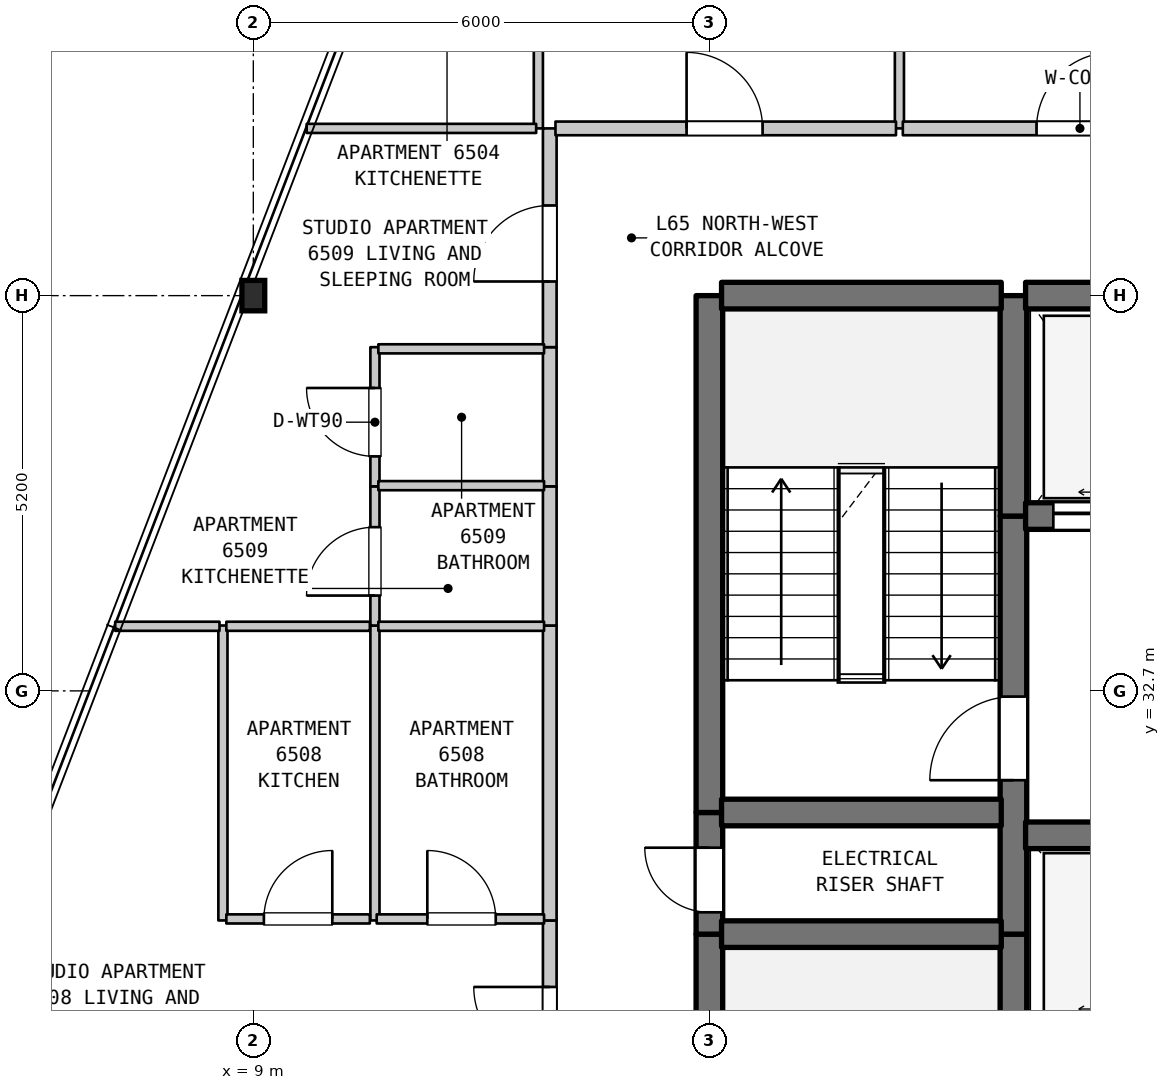
"""IFC4 building model, lengths in metres.
Left out: names, types, materials, properties, quantities, classifications, styles, units other than length and angle.
Written with IfcOpenShell. Run it as: python <this file> out.ifc"""

import sys

from ifc_helpers import new_model, si_unit, direction, frame, frame_2d, origin, origin_2d, place, context, subcontext, project, spatial, rectangle, i_section, extrude, element, fill, save


model = new_model("IFC4")
c1 = context("Model", 3, precision=1e-05, world=origin(), true_north=direction((0.0, 1.0)))
c2 = subcontext(c1, "Body", "Model", "MODEL_VIEW")
j1 = project(units=[si_unit("LENGTHUNIT", "METRE"), si_unit("PLANEANGLEUNIT", "RADIAN")], contexts=[c1])
p1 = place(None, origin())
s1 = spatial("IfcSite", under=j1, at=p1, CompositionType="ELEMENT")
p2 = place(p1, origin())
s2 = spatial("IfcBuilding", under=s1, at=p2, CompositionType="ELEMENT")
p3 = place(p2, frame((0.0, 0.0, 262.1)))
s3 = spatial("IfcBuildingStorey", under=s2, at=p3, CompositionType="ELEMENT", Elevation=262.1)
p4 = place(p3, frame((9.0, 37.9, 0.0), z_axis=(0.0, 0.0, 1.0), x_axis=(1.0, 0.0, 0.0)))
e1 = element("IfcColumn", 1, at=p4, inside=s3, PredefinedType="COLUMN", context=c2, shape_type="SweptSolid", body=[
    extrude(i_section(OverallWidth=0.3, OverallDepth=0.4, WebThickness=0.013, FlangeThickness=0.024, FilletRadius=0.027, at=origin_2d()), origin(), (0.0, 0.0, 1.0), 3.7),
])
for number, where, z_axis, x_axis in (
    (2, (8.6, 29.68, 0.0), (0.0, 0.0, 1.0), (0.0, 1.0, 0.0)),
    (3, (10.6, 29.68, 0.0), (0.0, 0.0, 1.0), (0.0, 1.0, 0.0)),
):
    element("IfcWall", number, at=place(p3, frame(where, z_axis=z_axis, x_axis=x_axis)), inside=s3, PredefinedType="PARTITIONING", context=c2, shape_type="SweptSolid", body=[
        extrude(rectangle(XDim=3.88, YDim=0.12, at=frame_2d((1.94, 0.0))), origin(), (0.0, 0.0, 1.0), 3.39),
    ])
p5 = place(p3, frame((10.6, 33.56, 0.0), z_axis=(0.0, 0.0, 1.0), x_axis=(0.0, 1.0, 0.0)))
e4 = element("IfcWall", 4, at=p5, inside=s3, PredefinedType="PARTITIONING", context=c2, shape_type="SweptSolid", body=[
    extrude(rectangle(XDim=1.831, YDim=0.12, at=frame_2d((0.916, 0.0))), origin(), (0.0, 0.0, 1.0), 3.39),
])
p6 = place(p5, frame((0.394, 0.0, 0.0)))
e5 = element("IfcOpeningElement", 5, at=p6, cuts=e4, PredefinedType="OPENING", context=c2, shape_type="SweptSolid", body=[
    extrude(rectangle(XDim=0.9, YDim=2.15, at=frame_2d((0.45, 1.075))), frame((0.0, 0.07, 0.0), z_axis=(0.0, -1.0, 0.0), x_axis=(1.0, 0.0, 0.0)), (0.0, 0.0, 1.0), 0.14),
])
p7 = place(p3, frame((10.6, 35.391, 0.0), z_axis=(0.0, 0.0, 1.0), x_axis=(0.0, 1.0, 0.0)))
e6 = element("IfcWall", 6, at=p7, inside=s3, PredefinedType="PARTITIONING", context=c2, shape_type="SweptSolid", body=[
    extrude(rectangle(XDim=1.831, YDim=0.12, at=frame_2d((0.916, 0.0))), origin(), (0.0, 0.0, 1.0), 3.39),
])
p8 = place(p7, frame((0.394, 0.0, 0.0)))
e7 = element("IfcOpeningElement", 7, at=p8, cuts=e6, PredefinedType="OPENING", context=c2, shape_type="SweptSolid", body=[
    extrude(rectangle(XDim=0.9, YDim=2.1, at=frame_2d((0.45, 1.05))), frame((0.0, 0.07, 0.0), z_axis=(0.0, -1.0, 0.0), x_axis=(1.0, 0.0, 0.0)), (0.0, 0.0, 1.0), 0.14),
])
p9 = place(p3, frame((12.75, 40.1, 0.0), z_axis=(0.0, 0.0, 1.0), x_axis=(0.0, 1.0, 0.0)))
e8 = element("IfcWall", 8, at=p9, inside=s3, PredefinedType="PARTITIONING", context=c2, shape_type="SweptSolid", body=[
    extrude(rectangle(XDim=3.2, YDim=0.12, at=frame_2d((1.6, 0.0))), origin(), (0.0, 0.0, 1.0), 3.39),
])
p10 = place(p9, frame((1.15, 0.0, 0.0)))
e9 = element("IfcOpeningElement", 9, at=p10, cuts=e8, PredefinedType="OPENING", context=c2, shape_type="SweptSolid", body=[
    extrude(rectangle(XDim=0.9, YDim=2.15, at=frame_2d((0.45, 1.075))), frame((0.0, 0.07, 0.0), z_axis=(0.0, -1.0, 0.0), x_axis=(1.0, 0.0, 0.0)), (0.0, 0.0, 1.0), 0.14),
])
p11 = place(p3, frame((12.9, 26.93, 0.0), z_axis=(0.0, 0.0, 1.0), x_axis=(0.0, 1.0, 0.0)))
e10 = element("IfcWall", 10, at=p11, inside=s3, PredefinedType="STANDARD", context=c2, shape_type="SweptSolid", body=[
    extrude(rectangle(XDim=2.75, YDim=0.18, at=frame_2d((1.375, 0.0))), origin(), (0.0, 0.0, 1.0), 3.39),
])
p12 = place(p11, frame((0.875, 0.0, 0.0)))
e11 = element("IfcOpeningElement", 11, at=p12, cuts=e10, PredefinedType="OPENING", context=c2, shape_type="SweptSolid", body=[
    extrude(rectangle(XDim=1.0, YDim=2.15, at=frame_2d((0.5, 1.075))), frame((0.0, 0.1, 0.0), z_axis=(0.0, -1.0, 0.0), x_axis=(1.0, 0.0, 0.0)), (0.0, 0.0, 1.0), 0.2),
])
p13 = place(p3, frame((12.9, 29.68, 0.0), z_axis=(0.0, 0.0, 1.0), x_axis=(0.0, 1.0, 0.0)))
e12 = element("IfcWall", 12, at=p13, inside=s3, PredefinedType="STANDARD", context=c2, shape_type="SweptSolid", body=[
    extrude(rectangle(XDim=3.88, YDim=0.18, at=frame_2d((1.94, 0.0))), origin(), (0.0, 0.0, 1.0), 3.39),
])
p14 = place(p3, frame((12.9, 33.56, 0.0), z_axis=(0.0, 0.0, 1.0), x_axis=(0.0, 1.0, 0.0)))
e13 = element("IfcWall", 13, at=p14, inside=s3, PredefinedType="STANDARD", context=c2, shape_type="SweptSolid", body=[
    extrude(rectangle(XDim=1.831, YDim=0.18, at=frame_2d((0.916, 0.0))), origin(), (0.0, 0.0, 1.0), 3.39),
])
p15 = place(p3, frame((12.9, 35.391, 0.0), z_axis=(0.0, 0.0, 1.0), x_axis=(0.0, 1.0, 0.0)))
e14 = element("IfcWall", 14, at=p15, inside=s3, PredefinedType="STANDARD", context=c2, shape_type="SweptSolid", body=[
    extrude(rectangle(XDim=1.831, YDim=0.18, at=frame_2d((0.916, 0.0))), origin(), (0.0, 0.0, 1.0), 3.39),
])
p16 = place(p3, frame((12.9, 37.222, 0.0), z_axis=(0.0, 0.0, 1.0), x_axis=(0.0, 1.0, 0.0)))
e15 = element("IfcWall", 15, at=p16, inside=s3, PredefinedType="STANDARD", context=c2, shape_type="SweptSolid", body=[
    extrude(rectangle(XDim=2.878, YDim=0.18, at=frame_2d((1.439, 0.0))), origin(), (0.0, 0.0, 1.0), 3.39),
])
p17 = place(p16, frame((0.864, 0.0, 0.0)))
e16 = element("IfcOpeningElement", 16, at=p17, cuts=e15, PredefinedType="OPENING", context=c2, shape_type="SweptSolid", body=[
    extrude(rectangle(XDim=1.0, YDim=2.15, at=frame_2d((0.5, 1.075))), frame((0.0, 0.1, 0.0), z_axis=(0.0, -1.0, 0.0), x_axis=(1.0, 0.0, 0.0)), (0.0, 0.0, 1.0), 0.2),
])
p18 = place(p3, frame((15.0, 22.7, 0.0), z_axis=(0.0, 0.0, 1.0), x_axis=(0.0, 1.0, 0.0)))
e17 = element("IfcWall", 17, at=p18, inside=s3, PredefinedType="SHEAR", context=c2, shape_type="SweptSolid", body=[
    extrude(rectangle(XDim=6.8, YDim=0.35, at=frame_2d((3.4, 0.0))), origin(), (0.0, 0.0, 1.0), 3.39),
])
p19 = place(p3, frame((15.0, 29.5, 0.0), z_axis=(0.0, 0.0, 1.0), x_axis=(0.0, 1.0, 0.0)))
e18 = element("IfcWall", 18, at=p19, inside=s3, PredefinedType="SHEAR", context=c2, shape_type="SweptSolid", body=[
    extrude(rectangle(XDim=1.6, YDim=0.35, at=frame_2d((0.8, 0.0))), origin(), (0.0, 0.0, 1.0), 3.39),
])
p20 = place(p19, frame((0.287, 0.0, 0.0)))
e19 = element("IfcOpeningElement", 19, at=p20, cuts=e18, PredefinedType="OPENING", context=c2, shape_type="SweptSolid", body=[
    extrude(rectangle(XDim=0.85, YDim=2.1, at=frame_2d((0.425, 1.05))), frame((0.0, 0.185, 0.0), z_axis=(0.0, -1.0, 0.0), x_axis=(1.0, 0.0, 0.0)), (0.0, 0.0, 1.0), 0.37),
])
p21 = place(p3, frame((15.0, 31.1, 0.0), z_axis=(0.0, 0.0, 1.0), x_axis=(0.0, 1.0, 0.0)))
e20 = element("IfcWall", 20, at=p21, inside=s3, PredefinedType="SHEAR", context=c2, shape_type="SweptSolid", body=[
    extrude(rectangle(XDim=6.8, YDim=0.35, at=frame_2d((3.4, 0.0))), origin(), (0.0, 0.0, 1.0), 3.39),
])
p22 = place(p3, frame((17.5, 40.1, 0.0), z_axis=(0.0, 0.0, 1.0), x_axis=(0.0, 1.0, 0.0)))
e21 = element("IfcWall", 21, at=p22, inside=s3, PredefinedType="PARTITIONING", context=c2, shape_type="SweptSolid", body=[
    extrude(rectangle(XDim=13.79, YDim=0.12, at=frame_2d((6.895, 0.0))), origin(), (0.0, 0.0, 1.0), 3.39),
])
p23 = place(p3, frame((19.0, 28.2, 0.0), z_axis=(0.0, 0.0, 1.0), x_axis=(0.0, 1.0, 0.0)))
e22 = element("IfcWall", 22, at=p23, inside=s3, PredefinedType="SHEAR", context=c2, shape_type="SweptSolid", body=[
    extrude(rectangle(XDim=1.3, YDim=0.35, at=frame_2d((0.65, 0.0))), origin(), (0.0, 0.0, 1.0), 3.39),
])
p24 = place(p3, frame((19.0, 29.5, 0.0), z_axis=(0.0, 0.0, 1.0), x_axis=(0.0, 1.0, 0.0)))
e23 = element("IfcWall", 23, at=p24, inside=s3, PredefinedType="SHEAR", context=c2, shape_type="SweptSolid", body=[
    extrude(rectangle(XDim=5.5, YDim=0.35, at=frame_2d((2.75, 0.0))), origin(), (0.0, 0.0, 1.0), 3.39),
])
p25 = place(p24, frame((2.025, 0.0, 0.0)))
e24 = element("IfcOpeningElement", 24, at=p25, cuts=e23, PredefinedType="OPENING", context=c2, shape_type="SweptSolid", body=[
    extrude(rectangle(XDim=1.1, YDim=2.15, at=frame_2d((0.55, 1.075))), frame((0.0, 0.185, 0.0), z_axis=(0.0, -1.0, 0.0), x_axis=(1.0, 0.0, 0.0)), (0.0, 0.0, 1.0), 0.37),
])
p26 = place(p3, frame((19.0, 35.0, 0.0), z_axis=(0.0, 0.0, 1.0), x_axis=(0.0, 1.0, 0.0)))
e25 = element("IfcWall", 25, at=p26, inside=s3, PredefinedType="SHEAR", context=c2, shape_type="SweptSolid", body=[
    extrude(rectangle(XDim=2.9, YDim=0.35, at=frame_2d((1.45, 0.0))), origin(), (0.0, 0.0, 1.0), 3.39),
])
p27 = place(p3, frame((15.16, 29.5, 0.0), z_axis=(0.0, 0.0, 1.0), x_axis=(1.0, 0.0, 0.0)))
e26 = element("IfcWall", 26, at=p27, inside=s3, PredefinedType="SHEAR", context=c2, shape_type="SweptSolid", body=[
    extrude(rectangle(XDim=3.68, YDim=0.35, at=frame_2d((1.84, 0.0))), origin(), (0.0, 0.0, 1.0), 3.39),
])
p28 = place(p3, frame((8.645, 29.7, 0.0), z_axis=(0.0, 0.0, 1.0), x_axis=(1.0, 0.0, 0.0)))
e27 = element("IfcWall", 27, at=p28, inside=s3, PredefinedType="PARTITIONING", context=c2, shape_type="SweptSolid", body=[
    extrude(rectangle(XDim=1.888, YDim=0.12, at=frame_2d((0.944, 0.0))), origin(), (0.0, 0.0, 1.0), 3.39),
])
p29 = place(p28, frame((0.494, 0.0, 0.0)))
e28 = element("IfcOpeningElement", 28, at=p29, cuts=e27, PredefinedType="OPENING", context=c2, shape_type="SweptSolid", body=[
    extrude(rectangle(XDim=0.9, YDim=2.15, at=frame_2d((0.45, 1.075))), frame((0.0, 0.07, 0.0), z_axis=(0.0, -1.0, 0.0), x_axis=(1.0, 0.0, 0.0)), (0.0, 0.0, 1.0), 0.14),
])
p30 = place(p3, frame((10.623, 29.7, 0.0), z_axis=(0.0, 0.0, 1.0), x_axis=(1.0, 0.0, 0.0)))
e29 = element("IfcWall", 29, at=p30, inside=s3, PredefinedType="PARTITIONING", context=c2, shape_type="SweptSolid", body=[
    extrude(rectangle(XDim=2.202, YDim=0.12, at=frame_2d((1.101, 0.0))), origin(), (0.0, 0.0, 1.0), 3.39),
])
p31 = place(p30, frame((0.666, 0.0, 0.0)))
e30 = element("IfcOpeningElement", 30, at=p31, cuts=e29, PredefinedType="OPENING", context=c2, shape_type="SweptSolid", body=[
    extrude(rectangle(XDim=0.9, YDim=2.1, at=frame_2d((0.45, 1.05))), frame((0.0, 0.07, 0.0), z_axis=(0.0, -1.0, 0.0), x_axis=(1.0, 0.0, 0.0)), (0.0, 0.0, 1.0), 0.14),
])
p32 = place(p3, frame((19.16, 30.8, 0.0), z_axis=(0.0, 0.0, 1.0), x_axis=(1.0, 0.0, 0.0)))
e31 = element("IfcWall", 31, at=p32, inside=s3, PredefinedType="SHEAR", context=c2, shape_type="SweptSolid", body=[
    extrude(rectangle(XDim=4.48, YDim=0.35, at=frame_2d((2.24, 0.0))), origin(), (0.0, 0.0, 1.0), 3.39),
])
p33 = place(p3, frame((15.16, 31.1, 0.0), z_axis=(0.0, 0.0, 1.0), x_axis=(1.0, 0.0, 0.0)))
e32 = element("IfcWall", 32, at=p33, inside=s3, PredefinedType="SHEAR", context=c2, shape_type="SweptSolid", body=[
    extrude(rectangle(XDim=3.68, YDim=0.35, at=frame_2d((1.84, 0.0))), origin(), (0.0, 0.0, 1.0), 3.39),
])
p34 = place(p3, frame((7.183, 33.55, 0.0), z_axis=(0.0, 0.0, 1.0), x_axis=(1.0, 0.0, 0.0)))
e33 = element("IfcWall", 33, at=p34, inside=s3, PredefinedType="PARTITIONING", context=c2, shape_type="SweptSolid", body=[
    extrude(rectangle(XDim=1.372, YDim=0.12, at=frame_2d((0.686, 0.0))), origin(), (0.0, 0.0, 1.0), 3.39),
])
p35 = place(p3, frame((8.645, 33.55, 0.0), z_axis=(0.0, 0.0, 1.0), x_axis=(1.0, 0.0, 0.0)))
e34 = element("IfcWall", 34, at=p35, inside=s3, PredefinedType="PARTITIONING", context=c2, shape_type="SweptSolid", body=[
    extrude(rectangle(XDim=1.888, YDim=0.12, at=frame_2d((0.944, 0.0))), origin(), (0.0, 0.0, 1.0), 3.39),
])
p36 = place(p3, frame((10.645, 33.55, 0.0), z_axis=(0.0, 0.0, 1.0), x_axis=(1.0, 0.0, 0.0)))
e35 = element("IfcWall", 35, at=p36, inside=s3, PredefinedType="PARTITIONING", context=c2, shape_type="SweptSolid", body=[
    extrude(rectangle(XDim=2.18, YDim=0.12, at=frame_2d((1.09, 0.0))), origin(), (0.0, 0.0, 1.0), 3.39),
])
p37 = place(p3, frame((19.16, 35.0, 0.0), z_axis=(0.0, 0.0, 1.0), x_axis=(1.0, 0.0, 0.0)))
e36 = element("IfcWall", 36, at=p37, inside=s3, PredefinedType="SHEAR", context=c2, shape_type="SweptSolid", body=[
    extrude(rectangle(XDim=4.48, YDim=0.35, at=frame_2d((2.24, 0.0))), origin(), (0.0, 0.0, 1.0), 3.39),
])
p38 = place(p37, frame((0.365, 0.0, 0.0)))
e37 = element("IfcOpeningElement", 37, at=p38, cuts=e36, PredefinedType="OPENING", context=c2, shape_type="SweptSolid", body=[
    extrude(rectangle(XDim=1.35, YDim=2.2, at=frame_2d((0.675, 1.1))), frame((0.0, 0.185, 0.0), z_axis=(0.0, -1.0, 0.0), x_axis=(1.0, 0.0, 0.0)), (0.0, 0.0, 1.0), 0.37),
])
p39 = place(p37, frame((2.765, 0.0, 0.0)))
e38 = element("IfcOpeningElement", 38, at=p39, cuts=e36, PredefinedType="OPENING", context=c2, shape_type="SweptSolid", body=[
    extrude(rectangle(XDim=1.35, YDim=2.2, at=frame_2d((0.675, 1.1))), frame((0.0, 0.185, 0.0), z_axis=(0.0, -1.0, 0.0), x_axis=(1.0, 0.0, 0.0)), (0.0, 0.0, 1.0), 0.37),
])
for number, where, z_axis, x_axis in (
    (39, (10.645, 35.4, 0.0), (0.0, 0.0, 1.0), (1.0, 0.0, 0.0)),
    (40, (10.645, 37.2, 0.0), (0.0, 0.0, 1.0), (1.0, 0.0, 0.0)),
):
    element("IfcWall", number, at=place(p3, frame(where, z_axis=z_axis, x_axis=x_axis)), inside=s3, PredefinedType="PARTITIONING", context=c2, shape_type="SweptSolid", body=[
        extrude(rectangle(XDim=2.18, YDim=0.12, at=frame_2d((1.09, 0.0))), origin(), (0.0, 0.0, 1.0), 3.39),
    ])
p40 = place(p3, frame((15.16, 37.9, 0.0), z_axis=(0.0, 0.0, 1.0), x_axis=(1.0, 0.0, 0.0)))
e41 = element("IfcWall", 41, at=p40, inside=s3, PredefinedType="SHEAR", context=c2, shape_type="SweptSolid", body=[
    extrude(rectangle(XDim=3.68, YDim=0.35, at=frame_2d((1.84, 0.0))), origin(), (0.0, 0.0, 1.0), 3.39),
])
p41 = place(p3, frame((19.16, 37.9, 0.0), z_axis=(0.0, 0.0, 1.0), x_axis=(1.0, 0.0, 0.0)))
e42 = element("IfcWall", 42, at=p41, inside=s3, PredefinedType="SHEAR", context=c2, shape_type="SweptSolid", body=[
    extrude(rectangle(XDim=4.48, YDim=0.35, at=frame_2d((2.24, 0.0))), origin(), (0.0, 0.0, 1.0), 3.39),
])
p42 = place(p3, frame((9.702, 40.1, 0.0), z_axis=(0.0, 0.0, 1.0), x_axis=(1.0, 0.0, 0.0)))
e43 = element("IfcWall", 43, at=p42, inside=s3, PredefinedType="PARTITIONING", context=c2, shape_type="SweptSolid", body=[
    extrude(rectangle(XDim=3.019, YDim=0.12, at=frame_2d((1.51, 0.0))), origin(), (0.0, 0.0, 1.0), 3.39),
])
p43 = place(p3, frame((12.975, 40.1, 0.0), z_axis=(0.0, 0.0, 1.0), x_axis=(1.0, 0.0, 0.0)))
e44 = element("IfcWall", 44, at=p43, inside=s3, PredefinedType="STANDARD", context=c2, shape_type="SweptSolid", body=[
    extrude(rectangle(XDim=4.48, YDim=0.18, at=frame_2d((2.24, 0.0))), origin(), (0.0, 0.0, 1.0), 3.39),
])
p44 = place(p43, frame((1.725, 0.0, 0.0)))
e45 = element("IfcOpeningElement", 45, at=p44, cuts=e44, PredefinedType="OPENING", context=c2, shape_type="SweptSolid", body=[
    extrude(rectangle(XDim=1.0, YDim=2.15, at=frame_2d((0.5, 1.075))), frame((0.0, 0.1, 0.0), z_axis=(0.0, -1.0, 0.0), x_axis=(1.0, 0.0, 0.0)), (0.0, 0.0, 1.0), 0.2),
])
p45 = place(p3, frame((17.545, 40.1, 0.0), z_axis=(0.0, 0.0, 1.0), x_axis=(1.0, 0.0, 0.0)))
e46 = element("IfcWall", 46, at=p45, inside=s3, PredefinedType="STANDARD", context=c2, shape_type="SweptSolid", body=[
    extrude(rectangle(XDim=4.66, YDim=0.18, at=frame_2d((2.33, 0.0))), origin(), (0.0, 0.0, 1.0), 3.39),
])
p46 = place(p45, frame((1.759, 0.0, 0.0)))
e47 = element("IfcOpeningElement", 47, at=p46, cuts=e46, PredefinedType="OPENING", context=c2, shape_type="SweptSolid", body=[
    extrude(rectangle(XDim=1.0, YDim=2.15, at=frame_2d((0.5, 1.075))), frame((0.0, 0.1, 0.0), z_axis=(0.0, -1.0, 0.0), x_axis=(1.0, 0.0, 0.0)), (0.0, 0.0, 1.0), 0.2),
])
p47 = place(p6, origin())
e48 = element("IfcDoor", 48, at=p47, inside=s3, OperationType="SINGLE_SWING_LEFT", PredefinedType="DOOR", context=c2, shape_type="SweptSolid", body=[
    extrude(rectangle(XDim=0.9, YDim=2.15, at=frame_2d((0.45, 1.075))), frame((0.0, 0.025, 0.0), z_axis=(0.0, -1.0, 0.0), x_axis=(1.0, 0.0, 0.0)), (0.0, 0.0, 1.0), 0.05),
])
fill(e5, e48)
p48 = place(p8, origin())
e49 = element("IfcDoor", 49, at=p48, inside=s3, OperationType="SINGLE_SWING_RIGHT", PredefinedType="DOOR", context=c2, shape_type="SweptSolid", body=[
    extrude(rectangle(XDim=0.9, YDim=2.1, at=frame_2d((0.45, 1.05))), frame((0.0, 0.025, 0.0), z_axis=(0.0, -1.0, 0.0), x_axis=(1.0, 0.0, 0.0)), (0.0, 0.0, 1.0), 0.05),
])
fill(e7, e49)
p49 = place(p12, origin())
e50 = element("IfcDoor", 50, at=p49, inside=s3, OperationType="SINGLE_SWING_RIGHT", PredefinedType="DOOR", context=c2, shape_type="SweptSolid", body=[
    extrude(rectangle(XDim=1.0, YDim=2.15, at=frame_2d((0.5, 1.075))), frame((0.0, 0.025, 0.0), z_axis=(0.0, -1.0, 0.0), x_axis=(1.0, 0.0, 0.0)), (0.0, 0.0, 1.0), 0.05),
])
fill(e11, e50)
p50 = place(p17, origin())
e51 = element("IfcDoor", 51, at=p50, inside=s3, OperationType="SINGLE_SWING_LEFT", PredefinedType="DOOR", context=c2, shape_type="SweptSolid", body=[
    extrude(rectangle(XDim=1.0, YDim=2.15, at=frame_2d((0.5, 1.075))), frame((0.0, 0.025, 0.0), z_axis=(0.0, -1.0, 0.0), x_axis=(1.0, 0.0, 0.0)), (0.0, 0.0, 1.0), 0.05),
])
fill(e16, e51)
p51 = place(p20, origin())
e52 = element("IfcDoor", 52, at=p51, inside=s3, OperationType="SINGLE_SWING_RIGHT", PredefinedType="DOOR", context=c2, shape_type="SweptSolid", body=[
    extrude(rectangle(XDim=0.85, YDim=2.1, at=frame_2d((0.425, 1.05))), frame((0.0, 0.025, 0.0), z_axis=(0.0, -1.0, 0.0), x_axis=(1.0, 0.0, 0.0)), (0.0, 0.0, 1.0), 0.05),
])
fill(e19, e52)
p52 = place(p25, origin())
e53 = element("IfcDoor", 53, at=p52, inside=s3, OperationType="SINGLE_SWING_LEFT", PredefinedType="DOOR", context=c2, shape_type="SweptSolid", body=[
    extrude(rectangle(XDim=1.1, YDim=2.15, at=frame_2d((0.55, 1.075))), frame((0.0, 0.025, 0.0), z_axis=(0.0, -1.0, 0.0), x_axis=(1.0, 0.0, 0.0)), (0.0, 0.0, 1.0), 0.05),
])
fill(e24, e53)
p53 = place(p29, origin())
e54 = element("IfcDoor", 54, at=p53, inside=s3, OperationType="SINGLE_SWING_RIGHT", PredefinedType="DOOR", context=c2, shape_type="SweptSolid", body=[
    extrude(rectangle(XDim=0.9, YDim=2.15, at=frame_2d((0.45, 1.075))), frame((0.0, 0.025, 0.0), z_axis=(0.0, -1.0, 0.0), x_axis=(1.0, 0.0, 0.0)), (0.0, 0.0, 1.0), 0.05),
])
fill(e28, e54)
p54 = place(p31, origin())
e55 = element("IfcDoor", 55, at=p54, inside=s3, OperationType="SINGLE_SWING_LEFT", PredefinedType="DOOR", context=c2, shape_type="SweptSolid", body=[
    extrude(rectangle(XDim=0.9, YDim=2.1, at=frame_2d((0.45, 1.05))), frame((0.0, 0.025, 0.0), z_axis=(0.0, -1.0, 0.0), x_axis=(1.0, 0.0, 0.0)), (0.0, 0.0, 1.0), 0.05),
])
fill(e30, e55)
p55 = place(p38, origin())
e56 = element("IfcDoor", 56, at=p55, inside=s3, OperationType="DOUBLE_DOOR_SLIDING", PredefinedType="DOOR", context=c2, shape_type="SweptSolid", body=[
    extrude(rectangle(XDim=1.35, YDim=2.2, at=frame_2d((0.675, 1.1))), frame((0.0, 0.025, 0.0), z_axis=(0.0, -1.0, 0.0), x_axis=(1.0, 0.0, 0.0)), (0.0, 0.0, 1.0), 0.05),
])
fill(e37, e56)
p56 = place(p44, origin())
e57 = element("IfcDoor", 57, at=p56, inside=s3, OperationType="SINGLE_SWING_LEFT", PredefinedType="DOOR", context=c2, shape_type="SweptSolid", body=[
    extrude(rectangle(XDim=1.0, YDim=2.15, at=frame_2d((0.5, 1.075))), frame((0.0, 0.025, 0.0), z_axis=(0.0, -1.0, 0.0), x_axis=(1.0, 0.0, 0.0)), (0.0, 0.0, 1.0), 0.05),
])
fill(e45, e57)
p57 = place(p46, origin())
e58 = element("IfcDoor", 58, at=p57, inside=s3, OperationType="SINGLE_SWING_RIGHT", PredefinedType="DOOR", context=c2, shape_type="SweptSolid", body=[
    extrude(rectangle(XDim=1.0, YDim=2.15, at=frame_2d((0.5, 1.075))), frame((0.0, 0.025, 0.0), z_axis=(0.0, -1.0, 0.0), x_axis=(1.0, 0.0, 0.0)), (0.0, 0.0, 1.0), 0.05),
])
fill(e47, e58)
save(model, sys.argv[1])
